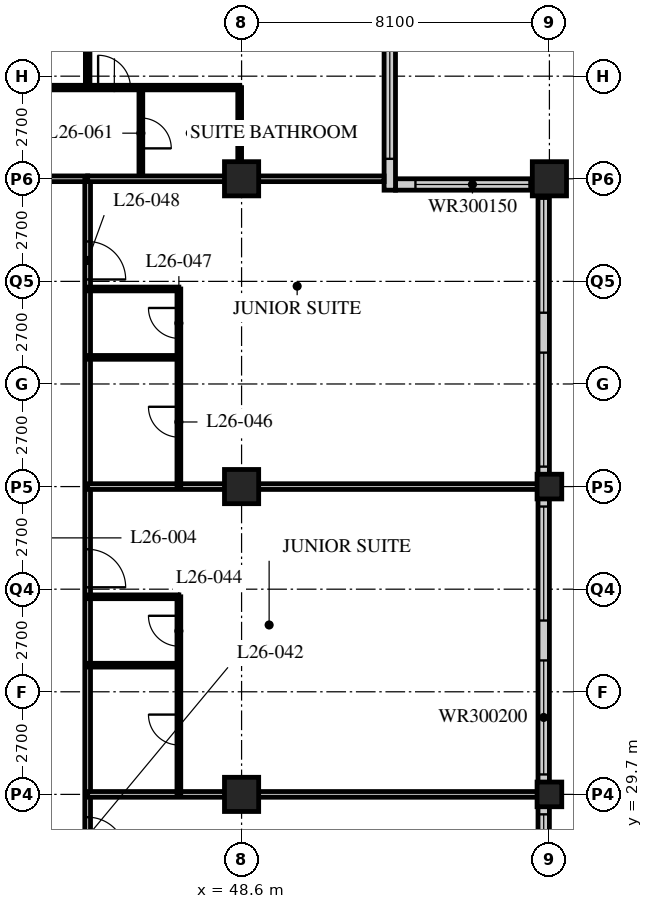
"""IFC4 building model, lengths in metres.
Left out: names, types, materials, properties, quantities, classifications, styles, units other than length and angle.
Written with IfcOpenShell. Run it as: python <this file> out.ifc"""

import sys

from ifc_helpers import new_model, si_unit, direction, frame, frame_2d, origin, origin_2d, place, context, subcontext, project, spatial, rectangle, hollow_rectangle, extrude, element, fill, save


model = new_model("IFC4")
c1 = context("Model", 3, precision=1e-05, world=origin(), true_north=direction((0.0, 1.0)))
c2 = subcontext(c1, "Body", "Model", "MODEL_VIEW")
j1 = project(units=[si_unit("LENGTHUNIT", "METRE"), si_unit("PLANEANGLEUNIT", "RADIAN")], contexts=[c1])
p1 = place(None, origin())
s1 = spatial("IfcSite", under=j1, at=p1, CompositionType="ELEMENT")
p2 = place(p1, origin())
s2 = spatial("IfcBuilding", under=s1, at=p2, CompositionType="ELEMENT")
p3 = place(p2, frame((0.0, 0.0, 106.8)))
s3 = spatial("IfcBuildingStorey", under=s2, at=p3, CompositionType="ELEMENT", Elevation=106.8)
for number, where, z_axis, x_axis in (
    (1, (48.6, 29.7, 0.0), (0.0, 0.0, 1.0), (1.0, 0.0, 0.0)),
    (2, (48.6, 37.8, 0.0), (0.0, 0.0, 1.0), (1.0, 0.0, 0.0)),
    (3, (48.6, 45.9, 0.0), (0.0, 0.0, 1.0), (1.0, 0.0, 0.0)),
):
    element("IfcColumn", number, at=place(p3, frame(where, z_axis=z_axis, x_axis=x_axis)), inside=s3, PredefinedType="COLUMN", context=c2, shape_type="SweptSolid", body=[
        extrude(hollow_rectangle(XDim=0.9, YDim=0.9, WallThickness=0.09, at=origin_2d()), origin(), (0.0, 0.0, 1.0), 3.4),
    ])
for number, where, z_axis, x_axis in (
    (4, (56.7, 29.7, 0.0), (0.0, 0.0, 1.0), (1.0, 0.0, 0.0)),
    (5, (56.7, 37.8, 0.0), (0.0, 0.0, 1.0), (1.0, 0.0, 0.0)),
):
    element("IfcColumn", number, at=place(p3, frame(where, z_axis=z_axis, x_axis=x_axis)), inside=s3, PredefinedType="COLUMN", context=c2, shape_type="SweptSolid", body=[
        extrude(hollow_rectangle(XDim=0.65, YDim=0.65, WallThickness=0.055, at=origin_2d()), origin(), (0.0, 0.0, 1.0), 3.4),
    ])
p4 = place(p3, frame((56.7, 45.9, 0.0), z_axis=(0.0, 0.0, 1.0), x_axis=(1.0, 0.0, 0.0)))
e6 = element("IfcColumn", 6, at=p4, inside=s3, PredefinedType="COLUMN", context=c2, shape_type="SweptSolid", body=[
    extrude(hollow_rectangle(XDim=0.9, YDim=0.9, WallThickness=0.09, at=origin_2d()), origin(), (0.0, 0.0, 1.0), 3.4),
])
p5 = place(p3, frame((56.55, 13.8, 0.0), z_axis=(0.0, 0.0, 1.0), x_axis=(0.0, 1.0, 0.0)))
e7 = element("IfcWall", 7, at=p5, inside=s3, PredefinedType="SOLIDWALL", context=c2, shape_type="SweptSolid", body=[
    extrude(rectangle(XDim=32.1, YDim=0.3, at=frame_2d((16.05, 0.0))), origin(), (0.0, 0.0, 1.0), 3.19),
])
p6 = place(p5, frame((0.225, 0.0, 0.9)))
e8 = element("IfcOpeningElement", 8, at=p6, cuts=e7, PredefinedType="OPENING", context=c2, shape_type="SweptSolid", body=[
    extrude(rectangle(XDim=3.0, YDim=2.0, at=frame_2d((1.5, 1.0))), frame((0.0, 0.16, 0.0), z_axis=(0.0, -1.0, 0.0), x_axis=(1.0, 0.0, 0.0)), (0.0, 0.0, 1.0), 0.32),
])
p7 = place(p5, frame((4.275, 0.0, 0.9)))
e9 = element("IfcOpeningElement", 9, at=p7, cuts=e7, PredefinedType="OPENING", context=c2, shape_type="SweptSolid", body=[
    extrude(rectangle(XDim=3.0, YDim=2.0, at=frame_2d((1.5, 1.0))), frame((0.0, 0.16, 0.0), z_axis=(0.0, -1.0, 0.0), x_axis=(1.0, 0.0, 0.0)), (0.0, 0.0, 1.0), 0.32),
])
p8 = place(p5, frame((8.325, 0.0, 0.9)))
e10 = element("IfcOpeningElement", 10, at=p8, cuts=e7, PredefinedType="OPENING", context=c2, shape_type="SweptSolid", body=[
    extrude(rectangle(XDim=3.0, YDim=2.0, at=frame_2d((1.5, 1.0))), frame((0.0, 0.16, 0.0), z_axis=(0.0, -1.0, 0.0), x_axis=(1.0, 0.0, 0.0)), (0.0, 0.0, 1.0), 0.32),
])
p9 = place(p5, frame((12.375, 0.0, 0.9)))
e11 = element("IfcOpeningElement", 11, at=p9, cuts=e7, PredefinedType="OPENING", context=c2, shape_type="SweptSolid", body=[
    extrude(rectangle(XDim=3.0, YDim=2.0, at=frame_2d((1.5, 1.0))), frame((0.0, 0.16, 0.0), z_axis=(0.0, -1.0, 0.0), x_axis=(1.0, 0.0, 0.0)), (0.0, 0.0, 1.0), 0.32),
])
p10 = place(p5, frame((16.425, 0.0, 0.9)))
e12 = element("IfcOpeningElement", 12, at=p10, cuts=e7, PredefinedType="OPENING", context=c2, shape_type="SweptSolid", body=[
    extrude(rectangle(XDim=3.0, YDim=2.0, at=frame_2d((1.5, 1.0))), frame((0.0, 0.16, 0.0), z_axis=(0.0, -1.0, 0.0), x_axis=(1.0, 0.0, 0.0)), (0.0, 0.0, 1.0), 0.32),
])
p11 = place(p5, frame((20.475, 0.0, 0.9)))
e13 = element("IfcOpeningElement", 13, at=p11, cuts=e7, PredefinedType="OPENING", context=c2, shape_type="SweptSolid", body=[
    extrude(rectangle(XDim=3.0, YDim=2.0, at=frame_2d((1.5, 1.0))), frame((0.0, 0.16, 0.0), z_axis=(0.0, -1.0, 0.0), x_axis=(1.0, 0.0, 0.0)), (0.0, 0.0, 1.0), 0.32),
])
p12 = place(p5, frame((24.525, 0.0, 0.9)))
e14 = element("IfcOpeningElement", 14, at=p12, cuts=e7, PredefinedType="OPENING", context=c2, shape_type="SweptSolid", body=[
    extrude(rectangle(XDim=3.0, YDim=2.0, at=frame_2d((1.5, 1.0))), frame((0.0, 0.16, 0.0), z_axis=(0.0, -1.0, 0.0), x_axis=(1.0, 0.0, 0.0)), (0.0, 0.0, 1.0), 0.32),
])
p13 = place(p5, frame((28.575, 0.0, 0.9)))
e15 = element("IfcOpeningElement", 15, at=p13, cuts=e7, PredefinedType="OPENING", context=c2, shape_type="SweptSolid", body=[
    extrude(rectangle(XDim=3.0, YDim=2.0, at=frame_2d((1.5, 1.0))), frame((0.0, 0.16, 0.0), z_axis=(0.0, -1.0, 0.0), x_axis=(1.0, 0.0, 0.0)), (0.0, 0.0, 1.0), 0.32),
])
p14 = place(p3, frame((56.4, 45.75, 0.0), z_axis=(0.0, 0.0, 1.0), x_axis=(-1.0, 0.0, 0.0)))
e16 = element("IfcWall", 16, at=p14, inside=s3, PredefinedType="SOLIDWALL", context=c2, shape_type="SweptSolid", body=[
    extrude(rectangle(XDim=3.75, YDim=0.3, at=frame_2d((1.875, 0.0))), origin(), (0.0, 0.0, 1.0), 3.19),
])
p15 = place(p14, frame((0.225, 0.0, 0.9)))
e17 = element("IfcOpeningElement", 17, at=p15, cuts=e16, PredefinedType="OPENING", context=c2, shape_type="SweptSolid", body=[
    extrude(rectangle(XDim=3.0, YDim=1.5, at=frame_2d((1.5, 0.75))), frame((0.0, 0.16, 0.0), z_axis=(0.0, -1.0, 0.0), x_axis=(1.0, 0.0, 0.0)), (0.0, 0.0, 1.0), 0.32),
])
p16 = place(p3, frame((52.5, 45.6, 0.0), z_axis=(0.0, 0.0, 1.0), x_axis=(0.0, 1.0, 0.0)))
e18 = element("IfcWall", 18, at=p16, inside=s3, PredefinedType="SOLIDWALL", context=c2, shape_type="SweptSolid", body=[
    extrude(rectangle(XDim=4.35, YDim=0.3, at=frame_2d((2.175, 0.0))), origin(), (0.0, 0.0, 1.0), 3.19),
])
p17 = place(p16, frame((0.825, 0.0, 0.9)))
e19 = element("IfcOpeningElement", 19, at=p17, cuts=e18, PredefinedType="OPENING", context=c2, shape_type="SweptSolid", body=[
    extrude(rectangle(XDim=3.0, YDim=1.5, at=frame_2d((1.5, 0.75))), frame((0.0, 0.16, 0.0), z_axis=(0.0, -1.0, 0.0), x_axis=(1.0, 0.0, 0.0)), (0.0, 0.0, 1.0), 0.32),
])
p18 = place(p3, frame((12.15, 45.9, 0.0), z_axis=(0.0, 0.0, 1.0), x_axis=(1.0, 0.0, 0.0)))
e20 = element("IfcWall", 20, at=p18, inside=s3, PredefinedType="PARTITIONING", context=c2, shape_type="SweptSolid", body=[
    extrude(rectangle(XDim=32.4, YDim=0.15, at=frame_2d((16.2, 0.0))), origin(), (0.0, 0.0, 1.0), 2.578),
])
p19 = place(p18, frame((9.5, 0.0, 0.0)))
e21 = element("IfcOpeningElement", 21, at=p19, cuts=e20, PredefinedType="OPENING", context=c2, shape_type="SweptSolid", body=[
    extrude(rectangle(XDim=1.0, YDim=2.1, at=frame_2d((0.5, 1.05))), frame((0.0, 0.085, 0.0), z_axis=(0.0, -1.0, 0.0), x_axis=(1.0, 0.0, 0.0)), (0.0, 0.0, 1.0), 0.17),
])
p20 = place(p18, frame((17.6, 0.0, 0.0)))
e22 = element("IfcOpeningElement", 22, at=p20, cuts=e20, PredefinedType="OPENING", context=c2, shape_type="SweptSolid", body=[
    extrude(rectangle(XDim=1.0, YDim=2.1, at=frame_2d((0.5, 1.05))), frame((0.0, 0.085, 0.0), z_axis=(0.0, -1.0, 0.0), x_axis=(1.0, 0.0, 0.0)), (0.0, 0.0, 1.0), 0.17),
])
p21 = place(p18, frame((25.7, 0.0, 0.0)))
e23 = element("IfcOpeningElement", 23, at=p21, cuts=e20, PredefinedType="OPENING", context=c2, shape_type="SweptSolid", body=[
    extrude(rectangle(XDim=1.0, YDim=2.1, at=frame_2d((0.5, 1.05))), frame((0.0, 0.085, 0.0), z_axis=(0.0, -1.0, 0.0), x_axis=(1.0, 0.0, 0.0)), (0.0, 0.0, 1.0), 0.17),
])
p22 = place(p18, frame((29.875, 0.0, 0.0)))
e24 = element("IfcOpeningElement", 24, at=p22, cuts=e20, PredefinedType="OPENING", context=c2, shape_type="SweptSolid", body=[
    extrude(rectangle(XDim=1.0, YDim=2.1, at=frame_2d((0.5, 1.05))), frame((0.0, 0.085, 0.0), z_axis=(0.0, -1.0, 0.0), x_axis=(1.0, 0.0, 0.0)), (0.0, 0.0, 1.0), 0.17),
])
p23 = place(p18, frame((1.525, 0.0, 0.0)))
e25 = element("IfcOpeningElement", 25, at=p23, cuts=e20, PredefinedType="OPENING", context=c2, shape_type="SweptSolid", body=[
    extrude(rectangle(XDim=1.0, YDim=2.1, at=frame_2d((0.5, 1.05))), frame((0.0, 0.085, 0.0), z_axis=(0.0, -1.0, 0.0), x_axis=(1.0, 0.0, 0.0)), (0.0, 0.0, 1.0), 0.17),
])
p24 = place(p3, frame((44.55, 21.6, 0.0), z_axis=(0.0, 0.0, 1.0), x_axis=(0.0, 1.0, 0.0)))
e26 = element("IfcWall", 26, at=p24, inside=s3, PredefinedType="PARTITIONING", context=c2, shape_type="SweptSolid", body=[
    extrude(rectangle(XDim=24.3, YDim=0.15, at=frame_2d((12.15, 0.0))), origin(), (0.0, 0.0, 1.0), 3.19),
])
p25 = place(p24, frame((2.75, 0.0, 0.0)))
e27 = element("IfcOpeningElement", 27, at=p25, cuts=e26, PredefinedType="OPENING", context=c2, shape_type="SweptSolid", body=[
    extrude(rectangle(XDim=1.0, YDim=2.1, at=frame_2d((0.5, 1.05))), frame((0.0, 0.085, 0.0), z_axis=(0.0, -1.0, 0.0), x_axis=(1.0, 0.0, 0.0)), (0.0, 0.0, 1.0), 0.17),
])
p26 = place(p24, frame((6.5, 0.0, 0.0)))
e28 = element("IfcOpeningElement", 28, at=p26, cuts=e26, PredefinedType="OPENING", context=c2, shape_type="SweptSolid", body=[
    extrude(rectangle(XDim=1.0, YDim=2.1, at=frame_2d((0.5, 1.05))), frame((0.0, 0.085, 0.0), z_axis=(0.0, -1.0, 0.0), x_axis=(1.0, 0.0, 0.0)), (0.0, 0.0, 1.0), 0.17),
])
p27 = place(p24, frame((13.55, 0.0, 0.0)))
e29 = element("IfcOpeningElement", 29, at=p27, cuts=e26, PredefinedType="OPENING", context=c2, shape_type="SweptSolid", body=[
    extrude(rectangle(XDim=1.0, YDim=2.1, at=frame_2d((0.5, 1.05))), frame((0.0, 0.085, 0.0), z_axis=(0.0, -1.0, 0.0), x_axis=(1.0, 0.0, 0.0)), (0.0, 0.0, 1.0), 0.17),
])
p28 = place(p24, frame((21.65, 0.0, 0.0)))
e30 = element("IfcOpeningElement", 30, at=p28, cuts=e26, PredefinedType="OPENING", context=c2, shape_type="SweptSolid", body=[
    extrude(rectangle(XDim=1.0, YDim=2.1, at=frame_2d((0.5, 1.05))), frame((0.0, 0.085, 0.0), z_axis=(0.0, -1.0, 0.0), x_axis=(1.0, 0.0, 0.0)), (0.0, 0.0, 1.0), 0.17),
])
p29 = place(p3, frame((44.55, 29.7, 0.0), z_axis=(0.0, 0.0, 1.0), x_axis=(1.0, 0.0, 0.0)))
e31 = element("IfcWall", 31, at=p29, inside=s3, PredefinedType="PARTITIONING", context=c2, shape_type="SweptSolid", body=[
    extrude(rectangle(XDim=11.85, YDim=0.15, at=frame_2d((5.925, 0.0))), origin(), (0.0, 0.0, 1.0), 2.578),
])
p30 = place(p3, frame((46.95, 29.7, 0.0), z_axis=(0.0, 0.0, 1.0), x_axis=(0.0, 1.0, 0.0)))
e32 = element("IfcWall", 32, at=p30, inside=s3, PredefinedType="PARTITIONING", context=c2, shape_type="SweptSolid", body=[
    extrude(rectangle(XDim=5.2, YDim=0.1, at=frame_2d((2.6, 0.0))), origin(), (0.0, 0.0, 1.0), 3.19),
])
p31 = place(p30, frame((1.3, 0.0, 0.0)))
e33 = element("IfcOpeningElement", 33, at=p31, cuts=e32, PredefinedType="OPENING", context=c2, shape_type="SweptSolid", body=[
    extrude(rectangle(XDim=0.8, YDim=2.1, at=frame_2d((0.4, 1.05))), frame((0.0, 0.06, 0.0), z_axis=(0.0, -1.0, 0.0), x_axis=(1.0, 0.0, 0.0)), (0.0, 0.0, 1.0), 0.12),
])
p32 = place(p30, frame((3.9, 0.0, 0.0)))
e34 = element("IfcOpeningElement", 34, at=p32, cuts=e32, PredefinedType="OPENING", context=c2, shape_type="SweptSolid", body=[
    extrude(rectangle(XDim=0.8, YDim=2.1, at=frame_2d((0.4, 1.05))), frame((0.0, 0.06, 0.0), z_axis=(0.0, -1.0, 0.0), x_axis=(1.0, 0.0, 0.0)), (0.0, 0.0, 1.0), 0.12),
])
for number, where, z_axis, x_axis in (
    (35, (44.55, 33.1, 0.0), (0.0, 0.0, 1.0), (1.0, 0.0, 0.0)),
    (36, (44.55, 34.9, 0.0), (0.0, 0.0, 1.0), (1.0, 0.0, 0.0)),
):
    element("IfcWall", number, at=place(p3, frame(where, z_axis=z_axis, x_axis=x_axis)), inside=s3, PredefinedType="PARTITIONING", context=c2, shape_type="SweptSolid", body=[
        extrude(rectangle(XDim=2.4, YDim=0.1, at=frame_2d((1.2, 0.0))), origin(), (0.0, 0.0, 1.0), 3.19),
    ])
p33 = place(p3, frame((44.55, 37.8, 0.0), z_axis=(0.0, 0.0, 1.0), x_axis=(1.0, 0.0, 0.0)))
e37 = element("IfcWall", 37, at=p33, inside=s3, PredefinedType="PARTITIONING", context=c2, shape_type="SweptSolid", body=[
    extrude(rectangle(XDim=11.85, YDim=0.15, at=frame_2d((5.925, 0.0))), origin(), (0.0, 0.0, 1.0), 2.578),
])
p34 = place(p3, frame((46.95, 37.8, 0.0), z_axis=(0.0, 0.0, 1.0), x_axis=(0.0, 1.0, 0.0)))
e38 = element("IfcWall", 38, at=p34, inside=s3, PredefinedType="PARTITIONING", context=c2, shape_type="SweptSolid", body=[
    extrude(rectangle(XDim=5.2, YDim=0.1, at=frame_2d((2.6, 0.0))), origin(), (0.0, 0.0, 1.0), 3.19),
])
p35 = place(p34, frame((1.3, 0.0, 0.0)))
e39 = element("IfcOpeningElement", 39, at=p35, cuts=e38, PredefinedType="OPENING", context=c2, shape_type="SweptSolid", body=[
    extrude(rectangle(XDim=0.8, YDim=2.1, at=frame_2d((0.4, 1.05))), frame((0.0, 0.06, 0.0), z_axis=(0.0, -1.0, 0.0), x_axis=(1.0, 0.0, 0.0)), (0.0, 0.0, 1.0), 0.12),
])
p36 = place(p34, frame((3.9, 0.0, 0.0)))
e40 = element("IfcOpeningElement", 40, at=p36, cuts=e38, PredefinedType="OPENING", context=c2, shape_type="SweptSolid", body=[
    extrude(rectangle(XDim=0.8, YDim=2.1, at=frame_2d((0.4, 1.05))), frame((0.0, 0.06, 0.0), z_axis=(0.0, -1.0, 0.0), x_axis=(1.0, 0.0, 0.0)), (0.0, 0.0, 1.0), 0.12),
])
for number, where, z_axis, x_axis in (
    (41, (44.55, 41.2, 0.0), (0.0, 0.0, 1.0), (1.0, 0.0, 0.0)),
    (42, (44.55, 43.0, 0.0), (0.0, 0.0, 1.0), (1.0, 0.0, 0.0)),
):
    element("IfcWall", number, at=place(p3, frame(where, z_axis=z_axis, x_axis=x_axis)), inside=s3, PredefinedType="PARTITIONING", context=c2, shape_type="SweptSolid", body=[
        extrude(rectangle(XDim=2.4, YDim=0.1, at=frame_2d((1.2, 0.0))), origin(), (0.0, 0.0, 1.0), 3.19),
    ])
p37 = place(p3, frame((40.5, 48.3, 0.0), z_axis=(0.0, 0.0, 1.0), x_axis=(1.0, 0.0, 0.0)))
e43 = element("IfcWall", 43, at=p37, inside=s3, PredefinedType="PARTITIONING", context=c2, shape_type="SweptSolid", body=[
    extrude(rectangle(XDim=8.05, YDim=0.12, at=frame_2d((4.025, 0.0))), origin(), (0.0, 0.0, 1.0), 3.19),
])
p38 = place(p37, frame((0.475, 0.0, 0.0)))
e44 = element("IfcOpeningElement", 44, at=p38, cuts=e43, PredefinedType="OPENING", context=c2, shape_type="SweptSolid", body=[
    extrude(rectangle(XDim=0.85, YDim=2.1, at=frame_2d((0.425, 1.05))), frame((0.0, 0.07, 0.0), z_axis=(0.0, -1.0, 0.0), x_axis=(1.0, 0.0, 0.0)), (0.0, 0.0, 1.0), 0.14),
])
p39 = place(p37, frame((4.325, 0.0, 0.0)))
e45 = element("IfcOpeningElement", 45, at=p39, cuts=e43, PredefinedType="OPENING", context=c2, shape_type="SweptSolid", body=[
    extrude(rectangle(XDim=0.85, YDim=2.1, at=frame_2d((0.425, 1.05))), frame((0.0, 0.07, 0.0), z_axis=(0.0, -1.0, 0.0), x_axis=(1.0, 0.0, 0.0)), (0.0, 0.0, 1.0), 0.14),
])
p40 = place(p3, frame((45.95, 45.9, 0.0), z_axis=(0.0, 0.0, 1.0), x_axis=(0.0, 1.0, 0.0)))
e46 = element("IfcWall", 46, at=p40, inside=s3, PredefinedType="PARTITIONING", context=c2, shape_type="SweptSolid", body=[
    extrude(rectangle(XDim=2.4, YDim=0.1, at=frame_2d((1.2, 0.0))), origin(), (0.0, 0.0, 1.0), 3.19),
])
p41 = place(p40, frame((0.8, 0.0, 0.0)))
e47 = element("IfcOpeningElement", 47, at=p41, cuts=e46, PredefinedType="OPENING", context=c2, shape_type="SweptSolid", body=[
    extrude(rectangle(XDim=0.8, YDim=2.1, at=frame_2d((0.4, 1.05))), frame((0.0, 0.06, 0.0), z_axis=(0.0, -1.0, 0.0), x_axis=(1.0, 0.0, 0.0)), (0.0, 0.0, 1.0), 0.12),
])
p42 = place(p3, frame((48.55, 45.9, 0.0), z_axis=(0.0, 0.0, 1.0), x_axis=(0.0, 1.0, 0.0)))
e48 = element("IfcWall", 48, at=p42, inside=s3, PredefinedType="PARTITIONING", context=c2, shape_type="SweptSolid", body=[
    extrude(rectangle(XDim=2.4, YDim=0.1, at=frame_2d((1.2, 0.0))), origin(), (0.0, 0.0, 1.0), 2.578),
])
p43 = place(p3, frame((44.55, 48.3, 0.0), z_axis=(0.0, 0.0, 1.0), x_axis=(0.0, 1.0, 0.0)))
e49 = element("IfcWall", 49, at=p43, inside=s3, PredefinedType="PARTITIONING", context=c2, shape_type="SweptSolid", body=[
    extrude(rectangle(XDim=5.4, YDim=0.12, at=frame_2d((2.7, 0.0))), origin(), (0.0, 0.0, 1.0), 3.19),
])
p44 = place(p3, frame((44.55, 45.9, 0.0), z_axis=(0.0, 0.0, 1.0), x_axis=(1.0, 0.0, 0.0)))
e50 = element("IfcWall", 50, at=p44, inside=s3, PredefinedType="PARTITIONING", context=c2, shape_type="SweptSolid", body=[
    extrude(rectangle(XDim=7.8, YDim=0.15, at=frame_2d((3.9, 0.0))), origin(), (0.0, 0.0, 1.0), 2.578),
])
p45 = place(p9, origin())
e51 = element("IfcWindow", 51, at=p45, inside=s3, PartitioningType="SINGLE_PANEL", PredefinedType="WINDOW", context=c2, shape_type="SweptSolid", body=[
    extrude(rectangle(XDim=3.0, YDim=2.0, at=frame_2d((1.5, 1.0))), frame((0.0, 0.03, 0.0), z_axis=(0.0, -1.0, 0.0), x_axis=(1.0, 0.0, 0.0)), (0.0, 0.0, 1.0), 0.06),
])
fill(e11, e51)
p46 = place(p10, origin())
e52 = element("IfcWindow", 52, at=p46, inside=s3, PartitioningType="SINGLE_PANEL", PredefinedType="WINDOW", context=c2, shape_type="SweptSolid", body=[
    extrude(rectangle(XDim=3.0, YDim=2.0, at=frame_2d((1.5, 1.0))), frame((0.0, 0.03, 0.0), z_axis=(0.0, -1.0, 0.0), x_axis=(1.0, 0.0, 0.0)), (0.0, 0.0, 1.0), 0.06),
])
fill(e12, e52)
p47 = place(p11, origin())
e53 = element("IfcWindow", 53, at=p47, inside=s3, PartitioningType="SINGLE_PANEL", PredefinedType="WINDOW", context=c2, shape_type="SweptSolid", body=[
    extrude(rectangle(XDim=3.0, YDim=2.0, at=frame_2d((1.5, 1.0))), frame((0.0, 0.03, 0.0), z_axis=(0.0, -1.0, 0.0), x_axis=(1.0, 0.0, 0.0)), (0.0, 0.0, 1.0), 0.06),
])
fill(e13, e53)
p48 = place(p12, origin())
e54 = element("IfcWindow", 54, at=p48, inside=s3, PartitioningType="SINGLE_PANEL", PredefinedType="WINDOW", context=c2, shape_type="SweptSolid", body=[
    extrude(rectangle(XDim=3.0, YDim=2.0, at=frame_2d((1.5, 1.0))), frame((0.0, 0.03, 0.0), z_axis=(0.0, -1.0, 0.0), x_axis=(1.0, 0.0, 0.0)), (0.0, 0.0, 1.0), 0.06),
])
fill(e14, e54)
p49 = place(p13, origin())
e55 = element("IfcWindow", 55, at=p49, inside=s3, PartitioningType="SINGLE_PANEL", PredefinedType="WINDOW", context=c2, shape_type="SweptSolid", body=[
    extrude(rectangle(XDim=3.0, YDim=2.0, at=frame_2d((1.5, 1.0))), frame((0.0, 0.03, 0.0), z_axis=(0.0, -1.0, 0.0), x_axis=(1.0, 0.0, 0.0)), (0.0, 0.0, 1.0), 0.06),
])
fill(e15, e55)
p50 = place(p15, origin())
e56 = element("IfcWindow", 56, at=p50, inside=s3, PartitioningType="SINGLE_PANEL", PredefinedType="WINDOW", context=c2, shape_type="SweptSolid", body=[
    extrude(rectangle(XDim=3.0, YDim=1.5, at=frame_2d((1.5, 0.75))), frame((0.0, 0.03, 0.0), z_axis=(0.0, -1.0, 0.0), x_axis=(1.0, 0.0, 0.0)), (0.0, 0.0, 1.0), 0.06),
])
fill(e17, e56)
p51 = place(p17, origin())
e57 = element("IfcWindow", 57, at=p51, inside=s3, PartitioningType="SINGLE_PANEL", PredefinedType="WINDOW", context=c2, shape_type="SweptSolid", body=[
    extrude(rectangle(XDim=3.0, YDim=1.5, at=frame_2d((1.5, 0.75))), frame((0.0, 0.03, 0.0), z_axis=(0.0, -1.0, 0.0), x_axis=(1.0, 0.0, 0.0)), (0.0, 0.0, 1.0), 0.06),
])
fill(e19, e57)
p52 = place(p26, origin())
e58 = element("IfcDoor", 58, at=p52, inside=s3, OperationType="SINGLE_SWING_RIGHT", PredefinedType="DOOR", context=c2, shape_type="SweptSolid", body=[
    extrude(rectangle(XDim=1.0, YDim=2.1, at=frame_2d((0.5, 1.05))), frame((0.0, 0.025, 0.0), z_axis=(0.0, -1.0, 0.0), x_axis=(1.0, 0.0, 0.0)), (0.0, 0.0, 1.0), 0.05),
])
fill(e28, e58)
p53 = place(p31, origin())
e59 = element("IfcDoor", 59, at=p53, inside=s3, OperationType="SINGLE_SWING_RIGHT", PredefinedType="DOOR", context=c2, shape_type="SweptSolid", body=[
    extrude(rectangle(XDim=0.8, YDim=2.1, at=frame_2d((0.4, 1.05))), frame((0.0, 0.025, 0.0), z_axis=(0.0, -1.0, 0.0), x_axis=(1.0, 0.0, 0.0)), (0.0, 0.0, 1.0), 0.05),
])
fill(e33, e59)
p54 = place(p32, origin())
e60 = element("IfcDoor", 60, at=p54, inside=s3, OperationType="SINGLE_SWING_RIGHT", PredefinedType="DOOR", context=c2, shape_type="SweptSolid", body=[
    extrude(rectangle(XDim=0.8, YDim=2.1, at=frame_2d((0.4, 1.05))), frame((0.0, 0.025, 0.0), z_axis=(0.0, -1.0, 0.0), x_axis=(1.0, 0.0, 0.0)), (0.0, 0.0, 1.0), 0.05),
])
fill(e34, e60)
p55 = place(p27, origin())
e61 = element("IfcDoor", 61, at=p55, inside=s3, OperationType="SINGLE_SWING_RIGHT", PredefinedType="DOOR", context=c2, shape_type="SweptSolid", body=[
    extrude(rectangle(XDim=1.0, YDim=2.1, at=frame_2d((0.5, 1.05))), frame((0.0, 0.025, 0.0), z_axis=(0.0, -1.0, 0.0), x_axis=(1.0, 0.0, 0.0)), (0.0, 0.0, 1.0), 0.05),
])
fill(e29, e61)
p56 = place(p35, origin())
e62 = element("IfcDoor", 62, at=p56, inside=s3, OperationType="SINGLE_SWING_RIGHT", PredefinedType="DOOR", context=c2, shape_type="SweptSolid", body=[
    extrude(rectangle(XDim=0.8, YDim=2.1, at=frame_2d((0.4, 1.05))), frame((0.0, 0.025, 0.0), z_axis=(0.0, -1.0, 0.0), x_axis=(1.0, 0.0, 0.0)), (0.0, 0.0, 1.0), 0.05),
])
fill(e39, e62)
p57 = place(p36, origin())
e63 = element("IfcDoor", 63, at=p57, inside=s3, OperationType="SINGLE_SWING_RIGHT", PredefinedType="DOOR", context=c2, shape_type="SweptSolid", body=[
    extrude(rectangle(XDim=0.8, YDim=2.1, at=frame_2d((0.4, 1.05))), frame((0.0, 0.025, 0.0), z_axis=(0.0, -1.0, 0.0), x_axis=(1.0, 0.0, 0.0)), (0.0, 0.0, 1.0), 0.05),
])
fill(e40, e63)
p58 = place(p28, origin())
e64 = element("IfcDoor", 64, at=p58, inside=s3, OperationType="SINGLE_SWING_RIGHT", PredefinedType="DOOR", context=c2, shape_type="SweptSolid", body=[
    extrude(rectangle(XDim=1.0, YDim=2.1, at=frame_2d((0.5, 1.05))), frame((0.0, 0.025, 0.0), z_axis=(0.0, -1.0, 0.0), x_axis=(1.0, 0.0, 0.0)), (0.0, 0.0, 1.0), 0.05),
])
fill(e30, e64)
p59 = place(p41, origin())
e65 = element("IfcDoor", 65, at=p59, inside=s3, OperationType="SINGLE_SWING_RIGHT", PredefinedType="DOOR", context=c2, shape_type="SweptSolid", body=[
    extrude(rectangle(XDim=0.8, YDim=2.1, at=frame_2d((0.4, 1.05))), frame((0.0, 0.025, 0.0), z_axis=(0.0, -1.0, 0.0), x_axis=(1.0, 0.0, 0.0)), (0.0, 0.0, 1.0), 0.05),
])
fill(e47, e65)
p60 = place(p39, origin())
e66 = element("IfcDoor", 66, at=p60, inside=s3, OperationType="SINGLE_SWING_LEFT", PredefinedType="DOOR", context=c2, shape_type="SweptSolid", body=[
    extrude(rectangle(XDim=0.85, YDim=2.1, at=frame_2d((0.425, 1.05))), frame((0.0, 0.025, 0.0), z_axis=(0.0, -1.0, 0.0), x_axis=(1.0, 0.0, 0.0)), (0.0, 0.0, 1.0), 0.05),
])
fill(e45, e66)
save(model, sys.argv[1])
